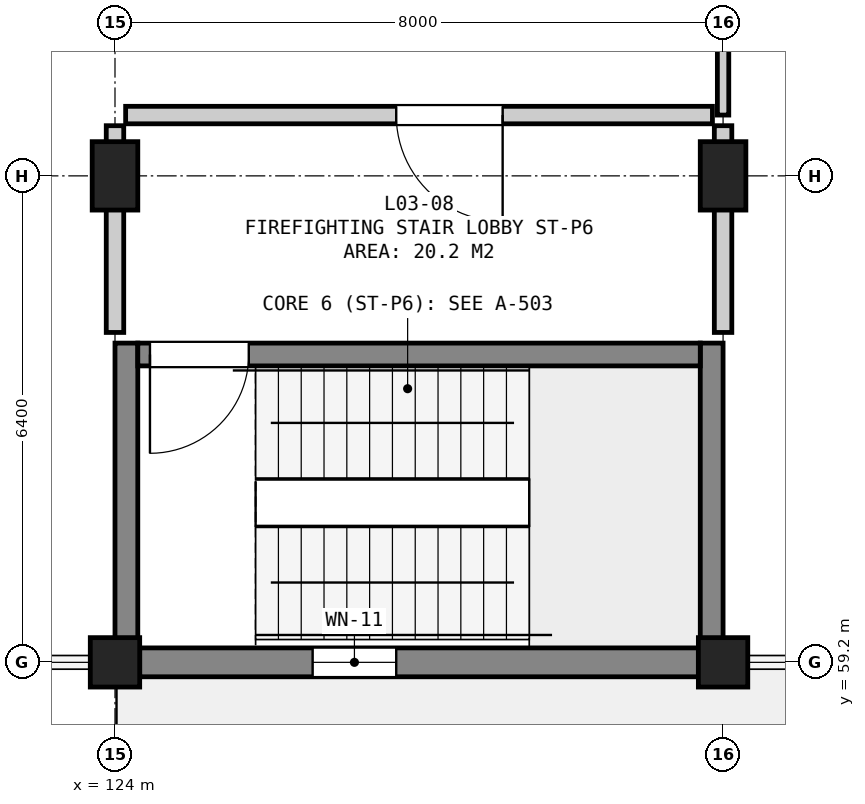
"""IFC4 building model, lengths in metres.
Left out: names, types, materials, properties, quantities, classifications, styles, units other than length and angle.
Written with IfcOpenShell. Run it as: python <this file> out.ifc"""

import sys

from ifc_helpers import new_model, si_unit, direction, frame, frame_2d, origin, origin_2d, place, context, subcontext, project, spatial, rectangle, extrude, element, fill, save


model = new_model("IFC4")
c1 = context("Model", 3, precision=1e-05, world=origin(), true_north=direction((0.0, 1.0)))
c2 = subcontext(c1, "Body", "Model", "MODEL_VIEW")
j1 = project(units=[si_unit("LENGTHUNIT", "METRE"), si_unit("PLANEANGLEUNIT", "RADIAN")], contexts=[c1])
p1 = place(None, origin())
s1 = spatial("IfcSite", under=j1, at=p1, CompositionType="ELEMENT")
p2 = place(p1, origin())
s2 = spatial("IfcBuilding", under=s1, at=p2, CompositionType="ELEMENT")
p3 = place(p2, frame((0.0, 0.0, 15.6)))
s3 = spatial("IfcBuildingStorey", under=s2, at=p3, CompositionType="ELEMENT", Elevation=15.6)
p4 = place(p3, frame((124.0, 59.2, 0.0), z_axis=(0.0, 0.0, 1.0), x_axis=(1.0, 0.0, 0.0)))
e1 = element("IfcColumn", 1, at=p4, inside=s3, PredefinedType="COLUMN", context=c2, shape_type="SweptSolid", body=[
    extrude(rectangle(XDim=0.65, YDim=0.65, at=origin_2d()), origin(), (0.0, 0.0, 1.0), 4.2),
])
p5 = place(p3, frame((124.0, 65.6, 0.0), z_axis=(0.0, 0.0, 1.0), x_axis=(1.0, 0.0, 0.0)))
e2 = element("IfcColumn", 2, at=p5, inside=s3, PredefinedType="COLUMN", context=c2, shape_type="SweptSolid", body=[
    extrude(rectangle(XDim=0.6, YDim=0.9, at=origin_2d()), origin(), (0.0, 0.0, 1.0), 4.2),
])
p6 = place(p3, frame((132.0, 59.2, 0.0), z_axis=(0.0, 0.0, 1.0), x_axis=(1.0, 0.0, 0.0)))
e3 = element("IfcColumn", 3, at=p6, inside=s3, PredefinedType="COLUMN", context=c2, shape_type="SweptSolid", body=[
    extrude(rectangle(XDim=0.65, YDim=0.65, at=origin_2d()), origin(), (0.0, 0.0, 1.0), 4.2),
])
p7 = place(p3, frame((132.0, 65.6, 0.0), z_axis=(0.0, 0.0, 1.0), x_axis=(1.0, 0.0, 0.0)))
e4 = element("IfcColumn", 4, at=p7, inside=s3, PredefinedType="COLUMN", context=c2, shape_type="SweptSolid", body=[
    extrude(rectangle(XDim=0.6, YDim=0.9, at=origin_2d()), origin(), (0.0, 0.0, 1.0), 4.2),
])
p8 = place(p3, frame((124.325, 59.2, 0.0), z_axis=(0.0, 0.0, 1.0), x_axis=(1.0, 0.0, 0.0)))
e5 = element("IfcWall", 5, at=p8, inside=s3, PredefinedType="SOLIDWALL", context=c2, shape_type="SweptSolid", body=[
    extrude(rectangle(XDim=7.35, YDim=0.38, at=frame_2d((3.675, 0.0))), origin(), (0.0, 0.0, 1.0), 3.295),
])
p9 = place(p8, frame((2.275, 0.0, 0.9)))
e6 = element("IfcOpeningElement", 6, at=p9, cuts=e5, PredefinedType="OPENING", context=c2, shape_type="SweptSolid", body=[
    extrude(rectangle(XDim=1.1, YDim=1.55, at=frame_2d((0.55, 0.775))), frame((0.0, 0.202, 0.0), z_axis=(0.0, -1.0, 0.0), x_axis=(1.0, 0.0, 0.0)), (0.0, 0.0, 1.0), 0.404),
])
for number, where, z_axis, x_axis in (
    (7, (124.15, 59.2, 0.0), (0.0, 0.0, 1.0), (0.0, 1.0, 0.0)),
    (8, (131.85, 59.2, 0.0), (0.0, 0.0, 1.0), (0.0, 1.0, 0.0)),
):
    element("IfcWall", number, at=place(p3, frame(where, z_axis=z_axis, x_axis=x_axis)), inside=s3, PredefinedType="SHEAR", context=c2, shape_type="SweptSolid", body=[
        extrude(rectangle(XDim=4.2, YDim=0.3, at=frame_2d((2.1, 0.0))), origin(), (0.0, 0.0, 1.0), 3.9),
    ])
p10 = place(p3, frame((124.3, 63.25, 0.0), z_axis=(0.0, 0.0, 1.0), x_axis=(1.0, 0.0, 0.0)))
e9 = element("IfcWall", 9, at=p10, inside=s3, PredefinedType="SHEAR", context=c2, shape_type="SweptSolid", body=[
    extrude(rectangle(XDim=7.4, YDim=0.3, at=frame_2d((3.7, 0.0))), origin(), (0.0, 0.0, 1.0), 3.9),
])
p11 = place(p10, frame((0.16, 0.0, 0.0)))
e10 = element("IfcOpeningElement", 10, at=p11, cuts=e9, PredefinedType="OPENING", context=c2, shape_type="SweptSolid", body=[
    extrude(rectangle(XDim=1.3, YDim=2.18, at=frame_2d((0.65, 1.09))), frame((0.0, 0.162, 0.0), z_axis=(0.0, -1.0, 0.0), x_axis=(1.0, 0.0, 0.0)), (0.0, 0.0, 1.0), 0.324),
])
p12 = place(p3, frame((124.14, 66.4, 0.0), z_axis=(0.0, 0.0, 1.0), x_axis=(1.0, 0.0, 0.0)))
e11 = element("IfcWall", 11, at=p12, inside=s3, PredefinedType="SOLIDWALL", context=c2, shape_type="SweptSolid", body=[
    extrude(rectangle(XDim=7.72, YDim=0.23, at=frame_2d((3.86, 0.0))), origin(), (0.0, 0.0, 1.0), 3.9),
])
p13 = place(p12, frame((3.56, 0.0, 0.0)))
e12 = element("IfcOpeningElement", 12, at=p13, cuts=e11, PredefinedType="OPENING", context=c2, shape_type="SweptSolid", body=[
    extrude(rectangle(XDim=1.4, YDim=2.2, at=frame_2d((0.7, 1.1))), frame((0.0, 0.127, 0.0), z_axis=(0.0, -1.0, 0.0), x_axis=(1.0, 0.0, 0.0)), (0.0, 0.0, 1.0), 0.254),
])
p14 = place(p3, frame((124.0, 63.54, 0.0), z_axis=(0.0, 0.0, 1.0), x_axis=(0.0, 1.0, 0.0)))
e13 = element("IfcWall", 13, at=p14, inside=s3, PredefinedType="SOLIDWALL", context=c2, shape_type="SweptSolid", body=[
    extrude(rectangle(XDim=2.72, YDim=0.23, at=frame_2d((1.36, 0.0))), origin(), (0.0, 0.0, 1.0), 3.295),
])
p15 = place(p3, frame((132.0, 63.54, 0.0), z_axis=(0.0, 0.0, 1.0), x_axis=(0.0, 1.0, 0.0)))
e14 = element("IfcWall", 14, at=p15, inside=s3, PredefinedType="SOLIDWALL", context=c2, shape_type="SweptSolid", body=[
    extrude(rectangle(XDim=2.72, YDim=0.23, at=frame_2d((1.36, 0.0))), origin(), (0.0, 0.0, 1.0), 3.145),
])
p16 = place(p3, frame((132.0, 66.4, 0.0), z_axis=(0.0, 0.0, 1.0), x_axis=(0.0, 1.0, 0.0)))
e15 = element("IfcWall", 15, at=p16, inside=s3, PredefinedType="PARTITIONING", context=c2, shape_type="SweptSolid", body=[
    extrude(rectangle(XDim=9.46, YDim=0.15, at=frame_2d((4.73, 0.0))), origin(), (0.0, 0.0, 1.0), 3.195),
])
p17 = place(p16, frame((2.2, 0.0, 0.0)))
e16 = element("IfcOpeningElement", 16, at=p17, cuts=e15, PredefinedType="OPENING", context=c2, shape_type="SweptSolid", body=[
    extrude(rectangle(XDim=1.2, YDim=2.15, at=frame_2d((0.6, 1.075))), frame((0.0, 0.087, 0.0), z_axis=(0.0, -1.0, 0.0), x_axis=(1.0, 0.0, 0.0)), (0.0, 0.0, 1.0), 0.174),
])
p18 = place(p9, origin())
e17 = element("IfcWindow", 17, at=p18, inside=s3, PartitioningType="SINGLE_PANEL", PredefinedType="WINDOW", context=c2, shape_type="SweptSolid", body=[
    extrude(rectangle(XDim=1.1, YDim=1.55, at=frame_2d((0.55, 0.775))), frame((0.0, 0.03, 0.0), z_axis=(0.0, -1.0, 0.0), x_axis=(1.0, 0.0, 0.0)), (0.0, 0.0, 1.0), 0.06),
])
fill(e6, e17)
p19 = place(p11, frame((1.3, 0.0, 0.0), z_axis=(0.0, 0.0, 1.0), x_axis=(-1.0, 0.0, 0.0)))
e18 = element("IfcDoor", 18, at=p19, inside=s3, OperationType="SINGLE_SWING_RIGHT", PredefinedType="DOOR", context=c2, shape_type="SweptSolid", body=[
    extrude(rectangle(XDim=1.3, YDim=2.18, at=frame_2d((0.65, 1.09))), frame((0.0, 0.025, 0.0), z_axis=(0.0, -1.0, 0.0), x_axis=(1.0, 0.0, 0.0)), (0.0, 0.0, 1.0), 0.05),
])
fill(e10, e18)
p20 = place(p13, frame((1.4, 0.0, 0.0), z_axis=(0.0, 0.0, 1.0), x_axis=(-1.0, 0.0, 0.0)))
e19 = element("IfcDoor", 19, at=p20, inside=s3, OperationType="SINGLE_SWING_LEFT", PredefinedType="DOOR", context=c2, shape_type="SweptSolid", body=[
    extrude(rectangle(XDim=1.4, YDim=2.2, at=frame_2d((0.7, 1.1))), frame((0.0, 0.025, 0.0), z_axis=(0.0, -1.0, 0.0), x_axis=(1.0, 0.0, 0.0)), (0.0, 0.0, 1.0), 0.05),
])
fill(e12, e19)
save(model, sys.argv[1])
